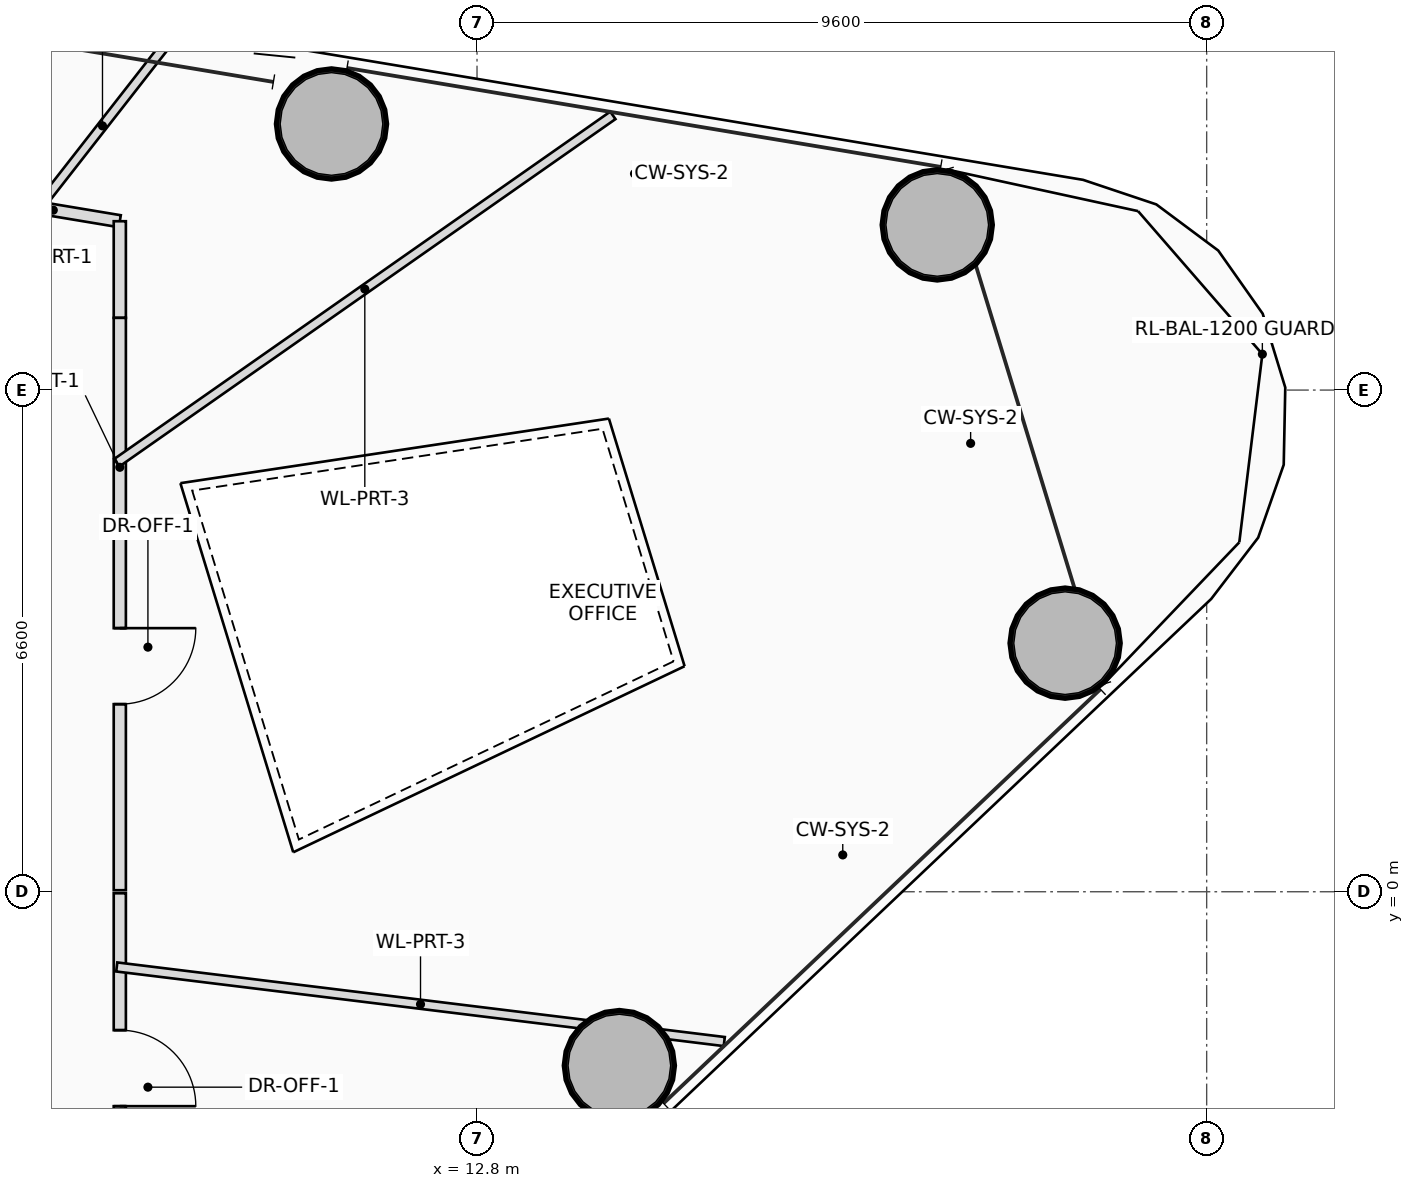
"""IFC4 building model, lengths in metres.
Left out: names, types, materials, properties, quantities, classifications, styles, units other than length and angle.
Written with IfcOpenShell. Run it as: python <this file> out.ifc"""

import sys

from ifc_helpers import new_model, si_unit, direction, frame, frame_2d, origin, origin_2d, place, context, subcontext, project, spatial, rectangle, hollow_circle, extrude, source, transform, mapped, element, fill, save


model = new_model("IFC4")
c1 = context("Model", 3, precision=1e-05, world=origin(), true_north=direction((0.0, 1.0)))
c2 = subcontext(c1, "Body", "Model", "MODEL_VIEW")
j1 = project(units=[si_unit("LENGTHUNIT", "METRE"), si_unit("PLANEANGLEUNIT", "RADIAN")], contexts=[c1])
p1 = place(None, origin())
s1 = spatial("IfcSite", under=j1, at=p1, CompositionType="ELEMENT")
p2 = place(p1, origin())
s2 = spatial("IfcBuilding", under=s1, at=p2, CompositionType="ELEMENT")
p3 = place(p2, frame((0.0, 0.0, 101.15)))
s3 = spatial("IfcBuildingStorey", under=s2, at=p3, CompositionType="ELEMENT", Elevation=101.15)
m1 = source(origin(), c2, "Body", "SweptSolid", [
    extrude(hollow_circle(Radius=0.725, WallThickness=0.05, at=origin_2d()), origin(), (0.0, 0.0, 1.0), 3.75),
])
for number, where, z_axis, x_axis in (
    (1, (14.673, -2.287, 0.0), (0.0, 0.0, 1.0), (1.0, 0.0, 0.0)),
    (2, (20.538, 3.271, 0.0), (0.0, 0.0, 1.0), (1.0, 0.0, 0.0)),
    (3, (18.855, 8.773, 0.0), (0.0, 0.0, 1.0), (1.0, 0.0, 0.0)),
    (4, (10.885, 10.101, 0.0), (0.0, 0.0, 1.0), (1.0, 0.0, 0.0)),
):
    element("IfcColumn", number, at=place(p3, frame(where, z_axis=z_axis, x_axis=x_axis)), inside=s3, PredefinedType="COLUMN", context=c2, shape_type="MappedRepresentation", body=[
        mapped(m1, transform((0.0, 0.0, 0.0), scale=1.0)),
    ])
p4 = place(p3, frame((6.35, 9.113, 0.0), z_axis=(0.0, 0.0, 1.0), x_axis=(0.986386484459, -0.164443617317, 0.0)))
e5 = element("IfcWall", 5, at=p4, inside=s3, PredefinedType="PARTITIONING", context=c2, shape_type="SweptSolid", body=[
    extrude(rectangle(XDim=1.774, YDim=0.16, at=frame_2d((0.887, 0.0))), origin(), (0.0, 0.0, 1.0), 3.2),
])
p5 = place(p3, frame((8.1, 8.821, 0.0), z_axis=(0.0, 0.0, 1.0), x_axis=(0.0, -1.0, 0.0)))
e6 = element("IfcWall", 6, at=p5, inside=s3, PredefinedType="PARTITIONING", context=c2, shape_type="SweptSolid", body=[
    extrude(rectangle(XDim=1.271, YDim=0.16, at=frame_2d((0.636, 0.0))), origin(), (0.0, 0.0, 1.0), 2.85),
])
p6 = place(p3, frame((8.1, 7.55, 0.0), z_axis=(0.0, 0.0, 1.0), x_axis=(0.0, -1.0, 0.0)))
e7 = element("IfcWall", 7, at=p6, inside=s3, PredefinedType="PARTITIONING", context=c2, shape_type="SweptSolid", body=[
    extrude(rectangle(XDim=7.53, YDim=0.16, at=frame_2d((3.765, 0.0))), origin(), (0.0, 0.0, 1.0), 2.85),
])
p7 = place(p6, frame((4.082, 0.0, 0.0)))
e8 = element("IfcOpeningElement", 8, at=p7, cuts=e7, PredefinedType="OPENING", context=c2, shape_type="SweptSolid", body=[
    extrude(rectangle(XDim=1.0, YDim=2.25, at=frame_2d((0.5, 1.125))), frame((0.0, 0.09, 0.0), z_axis=(0.0, -1.0, 0.0), x_axis=(1.0, 0.0, 0.0)), (0.0, 0.0, 1.0), 0.18),
])
p8 = place(p3, frame((8.1, -0.02, 0.0), z_axis=(0.0, 0.0, 1.0), x_axis=(0.0, -1.0, 0.0)))
e9 = element("IfcWall", 9, at=p8, inside=s3, PredefinedType="PARTITIONING", context=c2, shape_type="SweptSolid", body=[
    extrude(rectangle(XDim=6.126, YDim=0.16, at=frame_2d((3.063, 0.0))), origin(), (0.0, 0.0, 1.0), 2.85),
])
p9 = place(p8, frame((1.801, 0.0, 0.0)))
e10 = element("IfcOpeningElement", 10, at=p9, cuts=e9, PredefinedType="OPENING", context=c2, shape_type="SweptSolid", body=[
    extrude(rectangle(XDim=1.0, YDim=2.25, at=frame_2d((0.5, 1.125))), frame((0.0, 0.09, 0.0), z_axis=(0.0, -1.0, 0.0), x_axis=(1.0, 0.0, 0.0)), (0.0, 0.0, 1.0), 0.18),
])
p10 = place(p8, frame((4.284, 0.0, 0.0)))
e11 = element("IfcOpeningElement", 11, at=p10, cuts=e9, PredefinedType="OPENING", context=c2, shape_type="SweptSolid", body=[
    extrude(rectangle(XDim=1.0, YDim=2.25, at=frame_2d((0.5, 1.125))), frame((0.0, 0.09, 0.0), z_axis=(0.0, -1.0, 0.0), x_axis=(1.0, 0.0, 0.0)), (0.0, 0.0, 1.0), 0.18),
])
p11 = place(p3, frame((8.06, -0.99, 0.0), z_axis=(0.0, 0.0, 1.0), x_axis=(0.99254191086, -0.121903876831, 0.0)))
e12 = element("IfcWall", 12, at=p11, inside=s3, PredefinedType="PARTITIONING", context=c2, shape_type="SweptSolid", body=[
    extrude(rectangle(XDim=8.053, YDim=0.12, at=frame_2d((4.026, 0.0))), origin(), (0.0, 0.0, 1.0), 2.85),
])
p12 = place(p3, frame((8.06, 5.644, 0.0), z_axis=(0.0, 0.0, 1.0), x_axis=(0.819162822725, 0.573561042841, 0.0)))
e13 = element("IfcWall", 13, at=p12, inside=s3, PredefinedType="PARTITIONING", context=c2, shape_type="SweptSolid", body=[
    extrude(rectangle(XDim=7.968, YDim=0.12, at=frame_2d((3.984, 0.0))), origin(), (0.0, 0.0, 1.0), 2.85),
])
p13 = place(p3, frame((7.003, 8.964, 0.0), z_axis=(0.0, 0.0, 1.0), x_axis=(0.615657467661, 0.788013884721, 0.0)))
e14 = element("IfcWall", 14, at=p13, inside=s3, PredefinedType="PARTITIONING", context=c2, shape_type="SweptSolid", body=[
    extrude(rectangle(XDim=2.823, YDim=0.12, at=frame_2d((1.412, 0.0))), origin(), (0.0, 0.0, 1.0), 3.01),
])
p14 = place(p7, origin())
e15 = element("IfcDoor", 15, at=p14, inside=s3, OperationType="SINGLE_SWING_LEFT", PredefinedType="DOOR", context=c2, shape_type="SweptSolid", body=[
    extrude(rectangle(XDim=1.0, YDim=2.25, at=frame_2d((0.5, 1.125))), frame((0.0, 0.025, 0.0), z_axis=(0.0, -1.0, 0.0), x_axis=(1.0, 0.0, 0.0)), (0.0, 0.0, 1.0), 0.05),
])
fill(e8, e15)
p15 = place(p9, origin())
e16 = element("IfcDoor", 16, at=p15, inside=s3, OperationType="SINGLE_SWING_RIGHT", PredefinedType="DOOR", context=c2, shape_type="SweptSolid", body=[
    extrude(rectangle(XDim=1.0, YDim=2.25, at=frame_2d((0.5, 1.125))), frame((0.0, 0.025, 0.0), z_axis=(0.0, -1.0, 0.0), x_axis=(1.0, 0.0, 0.0)), (0.0, 0.0, 1.0), 0.05),
])
fill(e10, e16)
save(model, sys.argv[1])
